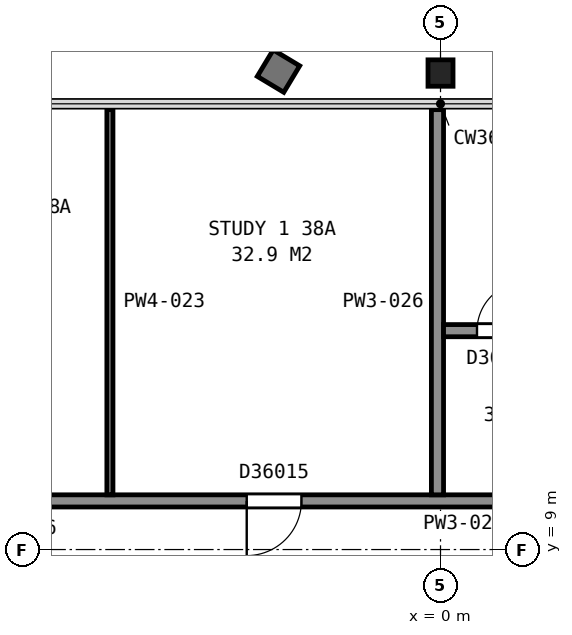
"""IFC4 building model, lengths in metres.
Left out: names, types, materials, properties, quantities, classifications, styles, units other than length and angle.
Written with IfcOpenShell. Run it as: python <this file> out.ifc"""

import sys

from ifc_helpers import new_model, si_unit, direction, frame, frame_2d, origin, origin_2d, place, context, subcontext, project, spatial, rectangle, i_section, extrude, element, fill, save


model = new_model("IFC4")
c1 = context("Model", 3, precision=1e-05, world=origin(), true_north=direction((0.0, 1.0)))
c2 = subcontext(c1, "Body", "Model", "MODEL_VIEW")
j1 = project(units=[si_unit("LENGTHUNIT", "METRE"), si_unit("PLANEANGLEUNIT", "RADIAN")], contexts=[c1])
p1 = place(None, origin())
s1 = spatial("IfcSite", under=j1, at=p1, CompositionType="ELEMENT")
p2 = place(p1, origin())
s2 = spatial("IfcBuilding", under=s1, at=p2, CompositionType="ELEMENT")
p3 = place(p2, frame((0.0, 0.0, 156.2)))
s3 = spatial("IfcBuildingStorey", under=s2, at=p3, CompositionType="ELEMENT", Elevation=156.2)
p4 = place(p3, frame((0.0, 16.617, 0.035), z_axis=(0.0, 0.185900290054, 0.982568614478), x_axis=(1.0, 0.0, 0.0)))
e1 = element("IfcColumn", 1, at=p4, inside=s3, PredefinedType="COLUMN", context=c2, shape_type="SweptSolid", body=[
    extrude(i_section(OverallWidth=0.411, OverallDepth=0.434, WebThickness=0.036, FlangeThickness=0.057, FilletRadius=0.015, at=origin_2d()), origin(), (0.0, 0.0, 1.0), 3.694),
])
p5 = place(p3, frame((-6.178, 5.299, 0.0), z_axis=(0.0, 0.0, 1.0), x_axis=(-0.866019993635, 0.500009370536, 0.0)))
e2 = element("IfcWall", 2, at=p5, inside=s3, PredefinedType="PARTITIONING", context=c2, shape_type="SweptSolid", body=[
    extrude(rectangle(XDim=9.6, YDim=0.2, at=frame_2d((4.8, 0.0))), origin(), (0.0, 0.0, 1.0), 3.45),
])
p6 = place(p3, frame((-8.878, 9.8, 0.0), z_axis=(0.0, 0.0, 1.0), x_axis=(1.0, 0.0, 0.0)))
e3 = element("IfcWall", 3, at=p6, inside=s3, PredefinedType="PARTITIONING", context=c2, shape_type="SweptSolid", body=[
    extrude(rectangle(XDim=17.756, YDim=0.2, at=frame_2d((8.878, 0.0))), origin(), (0.0, 0.0, 1.0), 2.713),
])
p7 = place(p6, frame((15.066, 0.0, 0.0)))
e4 = element("IfcOpeningElement", 4, at=p7, cuts=e3, PredefinedType="OPENING", context=c2, shape_type="SweptSolid", body=[
    extrude(rectangle(XDim=0.9, YDim=2.1, at=frame_2d((0.45, 1.05))), frame((0.0, 0.11, 0.0), z_axis=(0.0, -1.0, 0.0), x_axis=(1.0, 0.0, 0.0)), (0.0, 0.0, 1.0), 0.22),
])
p8 = place(p6, frame((11.928, 0.0, 0.0)))
e5 = element("IfcOpeningElement", 5, at=p8, cuts=e3, PredefinedType="OPENING", context=c2, shape_type="SweptSolid", body=[
    extrude(rectangle(XDim=0.9, YDim=2.1, at=frame_2d((0.45, 1.05))), frame((0.0, 0.11, 0.0), z_axis=(0.0, -1.0, 0.0), x_axis=(1.0, 0.0, 0.0)), (0.0, 0.0, 1.0), 0.22),
])
p9 = place(p6, frame((5.691, 0.0, 0.0)))
e6 = element("IfcOpeningElement", 6, at=p9, cuts=e3, PredefinedType="OPENING", context=c2, shape_type="SweptSolid", body=[
    extrude(rectangle(XDim=0.9, YDim=2.1, at=frame_2d((0.45, 1.05))), frame((0.0, 0.11, 0.0), z_axis=(0.0, -1.0, 0.0), x_axis=(1.0, 0.0, 0.0)), (0.0, 0.0, 1.0), 0.22),
])
p10 = place(p6, frame((1.553, 0.0, 0.0)))
e7 = element("IfcOpeningElement", 7, at=p10, cuts=e3, PredefinedType="OPENING", context=c2, shape_type="SweptSolid", body=[
    extrude(rectangle(XDim=0.9, YDim=2.1, at=frame_2d((0.45, 1.05))), frame((0.0, 0.11, 0.0), z_axis=(0.0, -1.0, 0.0), x_axis=(1.0, 0.0, 0.0)), (0.0, 0.0, 1.0), 0.22),
])
p11 = place(p3, frame((-5.437, 9.9, 0.0), z_axis=(0.0, 0.0, 1.0), x_axis=(0.0, 1.0, 0.0)))
e8 = element("IfcWall", 8, at=p11, inside=s3, PredefinedType="PARTITIONING", context=c2, shape_type="SweptSolid", body=[
    extrude(rectangle(XDim=6.335, YDim=0.1, at=frame_2d((3.167, 0.0))), origin(), (0.0, 0.0, 1.0), 2.713),
])
p12 = place(p3, frame((-0.05, 9.9, 0.0), z_axis=(0.0, 0.0, 1.0), x_axis=(0.0, 1.0, 0.0)))
e9 = element("IfcWall", 9, at=p12, inside=s3, PredefinedType="PARTITIONING", context=c2, shape_type="SweptSolid", body=[
    extrude(rectangle(XDim=6.335, YDim=0.2, at=frame_2d((3.167, 0.0))), origin(), (0.0, 0.0, 1.0), 2.713),
])
p13 = place(p3, frame((1.95, 12.6, 0.0), z_axis=(0.0, 0.0, 1.0), x_axis=(-1.0, 0.0, 0.0)))
e10 = element("IfcWall", 10, at=p13, inside=s3, PredefinedType="PARTITIONING", context=c2, shape_type="SweptSolid", body=[
    extrude(rectangle(XDim=1.9, YDim=0.2, at=frame_2d((0.95, 0.0))), origin(), (0.0, 0.0, 1.0), 2.713),
])
p14 = place(p13, frame((0.55, 0.0, 0.0)))
e11 = element("IfcOpeningElement", 11, at=p14, cuts=e10, PredefinedType="OPENING", context=c2, shape_type="SweptSolid", body=[
    extrude(rectangle(XDim=0.8, YDim=2.1, at=frame_2d((0.4, 1.05))), frame((0.0, 0.11, 0.0), z_axis=(0.0, -1.0, 0.0), x_axis=(1.0, 0.0, 0.0)), (0.0, 0.0, 1.0), 0.22),
])
p15 = place(p9, origin())
e12 = element("IfcDoor", 12, at=p15, inside=s3, OperationType="SINGLE_SWING_LEFT", PredefinedType="DOOR", context=c2, shape_type="SweptSolid", body=[
    extrude(rectangle(XDim=0.9, YDim=2.1, at=frame_2d((0.45, 1.05))), frame((0.0, 0.025, 0.0), z_axis=(0.0, -1.0, 0.0), x_axis=(1.0, 0.0, 0.0)), (0.0, 0.0, 1.0), 0.05),
])
fill(e6, e12)
p16 = place(p14, origin())
e13 = element("IfcDoor", 13, at=p16, inside=s3, OperationType="SINGLE_SWING_LEFT", PredefinedType="DOOR", context=c2, shape_type="SweptSolid", body=[
    extrude(rectangle(XDim=0.8, YDim=2.1, at=frame_2d((0.4, 1.05))), frame((0.0, 0.025, 0.0), z_axis=(0.0, -1.0, 0.0), x_axis=(1.0, 0.0, 0.0)), (0.0, 0.0, 1.0), 0.05),
])
fill(e11, e13)
save(model, sys.argv[1])
